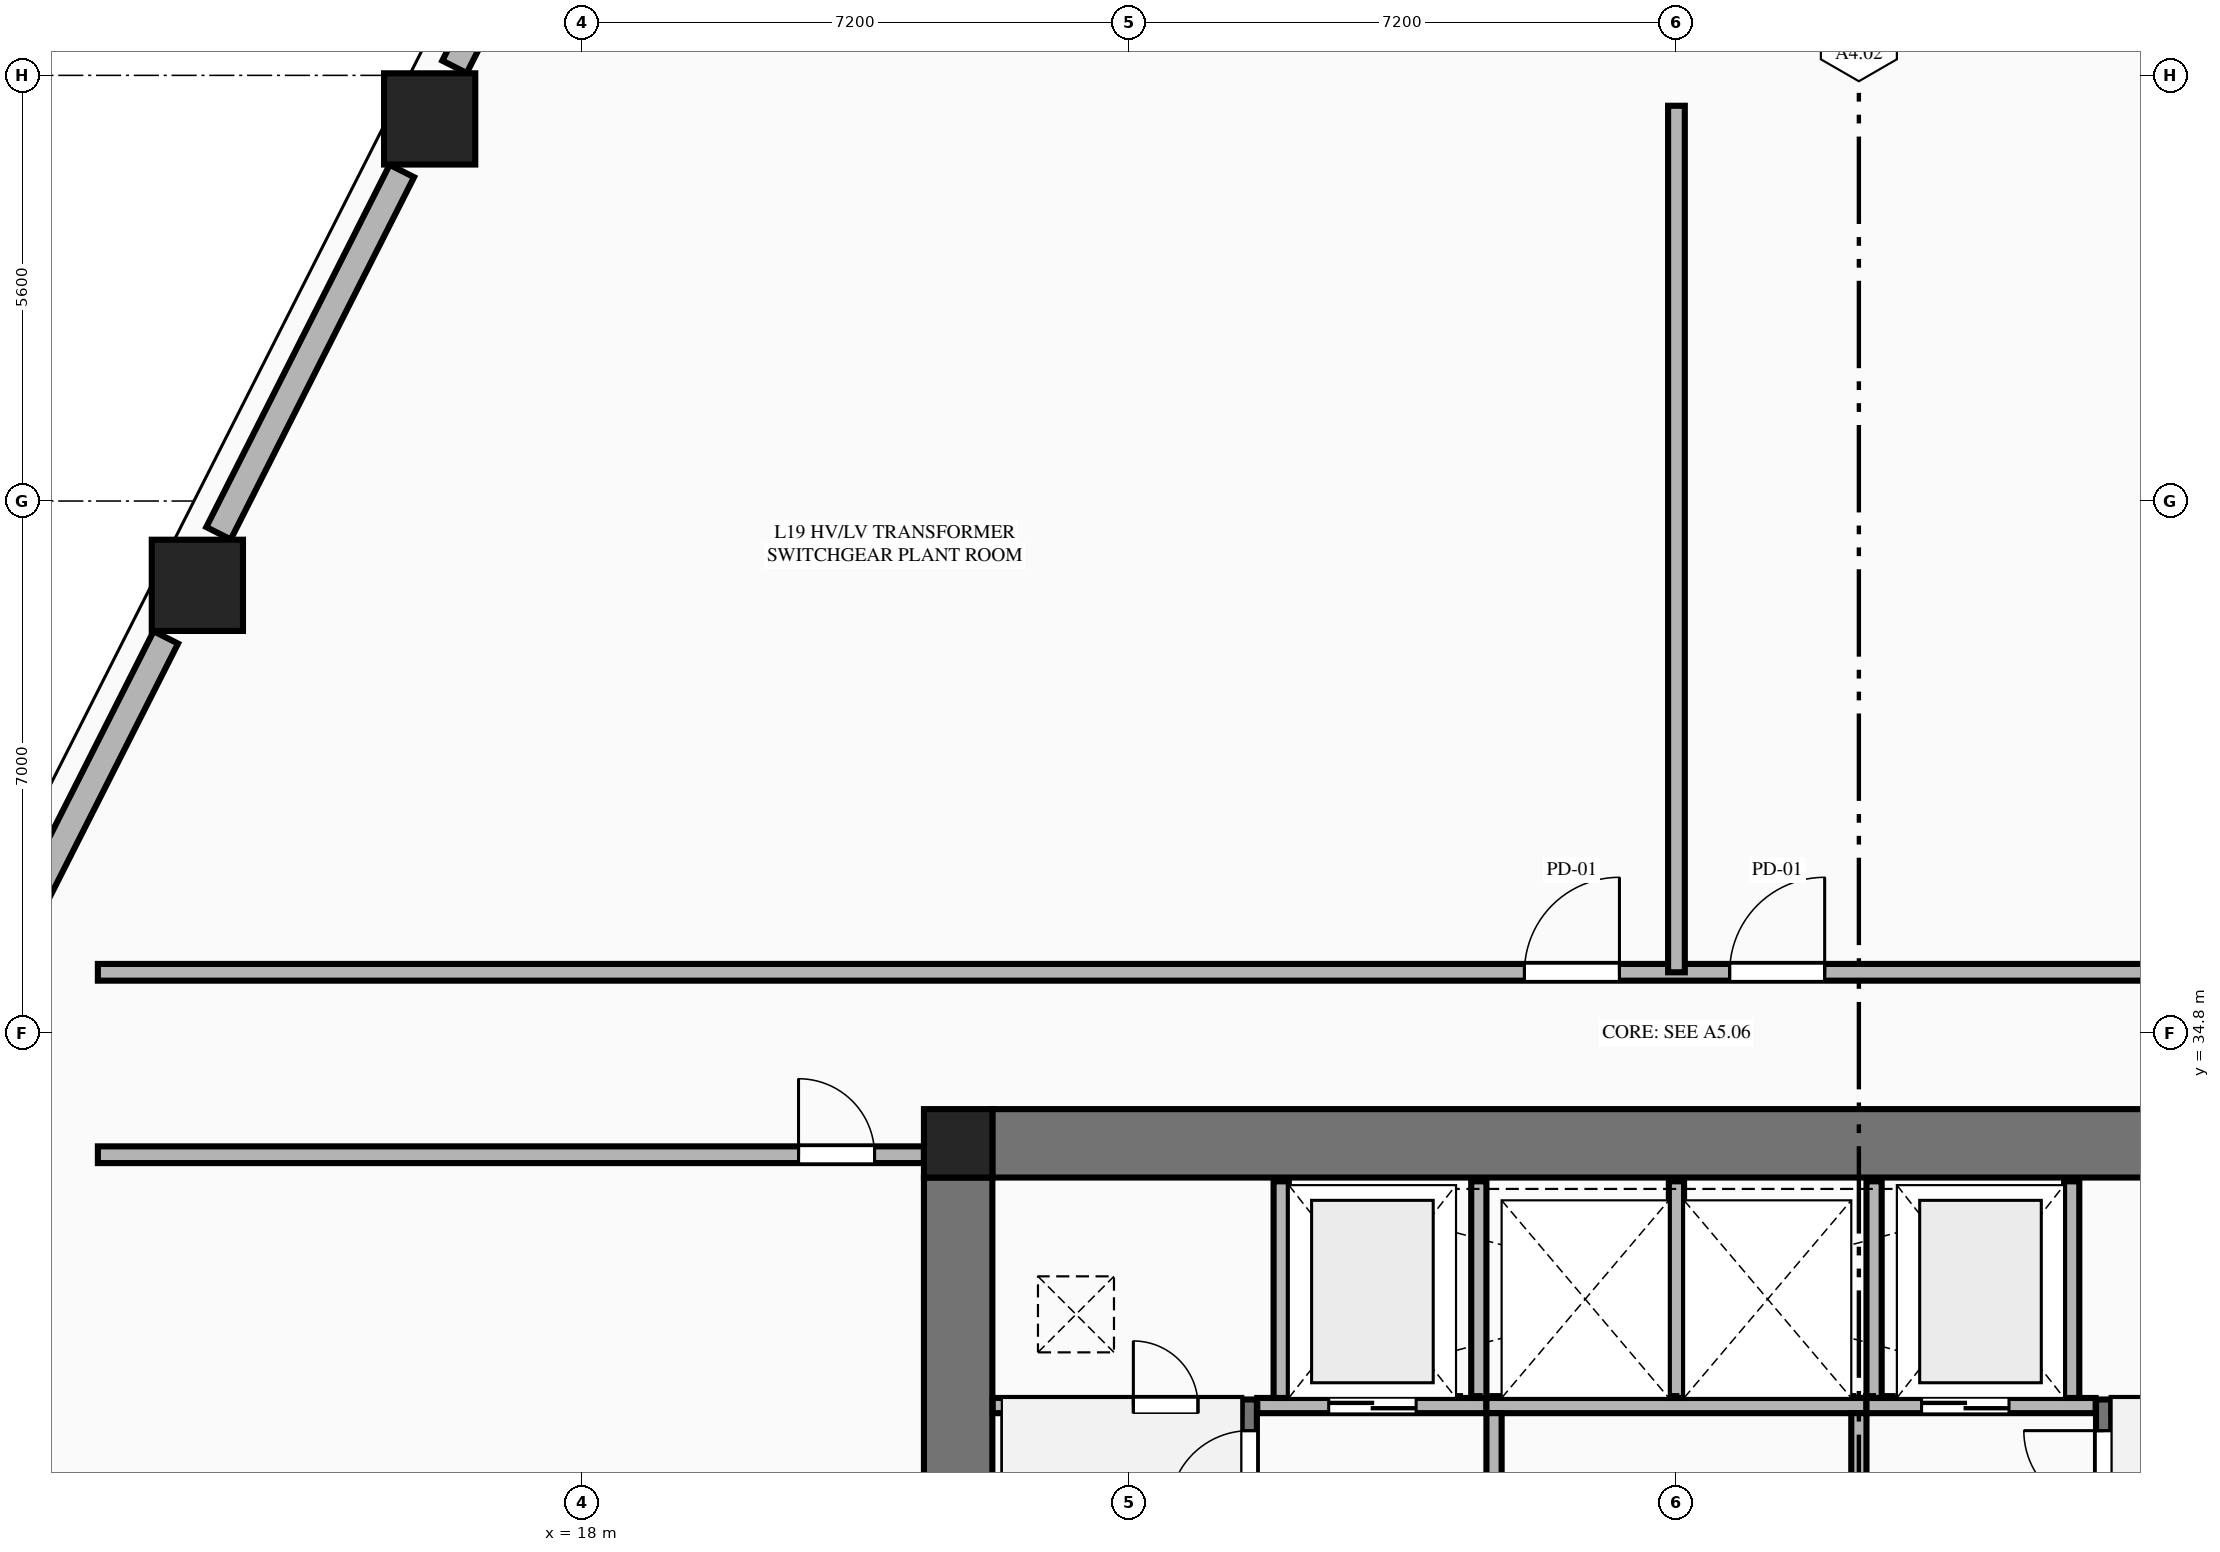
"""IFC4 building model, lengths in metres.
Left out: names, types, materials, properties, quantities, classifications, styles, units other than length and angle.
Written with IfcOpenShell. Run it as: python <this file> out.ifc"""

import sys

from ifc_helpers import new_model, si_unit, direction, frame, frame_2d, origin, origin_2d, place, context, subcontext, project, spatial, rectangle, extrude, element, fill, save


model = new_model("IFC4")
c1 = context("Model", 3, precision=1e-05, world=origin(), true_north=direction((0.0, 1.0)))
c2 = subcontext(c1, "Body", "Model", "MODEL_VIEW")
j1 = project(units=[si_unit("LENGTHUNIT", "METRE"), si_unit("PLANEANGLEUNIT", "RADIAN")], contexts=[c1])
p1 = place(None, origin())
s1 = spatial("IfcSite", under=j1, at=p1, CompositionType="ELEMENT")
p2 = place(p1, origin())
s2 = spatial("IfcBuilding", under=s1, at=p2, CompositionType="ELEMENT")
p3 = place(p2, frame((0.0, 0.0, 74.6)))
s3 = spatial("IfcBuildingStorey", under=s2, at=p3, CompositionType="ELEMENT", Elevation=74.6)
p4 = place(p3, frame((22.95, 33.35, 0.0), z_axis=(0.0, 0.0, 1.0), x_axis=(1.0, 0.0, 0.0)))
e1 = element("IfcColumn", 1, at=p4, inside=s3, PredefinedType="COLUMN", context=c2, shape_type="SweptSolid", body=[
    extrude(rectangle(XDim=0.9, YDim=0.9, at=origin_2d()), origin(), (0.0, 0.0, 1.0), 5.4),
])
p5 = place(p3, frame((23.4, 33.35, 0.0), z_axis=(0.0, 0.0, 1.0), x_axis=(1.0, 0.0, 0.0)))
e2 = element("IfcWall", 2, at=p5, inside=s3, PredefinedType="SHEAR", context=c2, shape_type="SweptSolid", body=[
    extrude(rectangle(XDim=18.0, YDim=0.9, at=frame_2d((9.0, 0.0))), origin(), (0.0, 0.0, 1.0), 5.18),
])
p6 = place(p3, frame((22.95, 18.9, 0.0), z_axis=(0.0, 0.0, 1.0), x_axis=(0.0, 1.0, 0.0)))
e3 = element("IfcWall", 3, at=p6, inside=s3, PredefinedType="SHEAR", context=c2, shape_type="SweptSolid", body=[
    extrude(rectangle(XDim=14.0, YDim=0.9, at=frame_2d((7.0, 0.0))), origin(), (0.0, 0.0, 1.0), 5.18),
])
p7 = place(p6, frame((2.94, 0.0, 0.0)))
e4 = element("IfcOpeningElement", 4, at=p7, cuts=e3, PredefinedType="OPENING", context=c2, shape_type="SweptSolid", body=[
    extrude(rectangle(XDim=1.22, YDim=2.25, at=frame_2d((0.61, 1.125))), frame((0.0, 0.46, 0.0), z_axis=(0.0, -1.0, 0.0), x_axis=(1.0, 0.0, 0.0)), (0.0, 0.0, 1.0), 0.92),
])
for number, where, z_axis, x_axis in (
    (5, (15.997, 46.827, 0.0), (0.0, 0.0, 1.0), (1.0, 0.0, 0.0)),
    (6, (12.941, 40.691, 0.0), (0.0, 0.0, 1.0), (1.0, 0.0, 0.0)),
):
    element("IfcColumn", number, at=place(p3, frame(where, z_axis=z_axis, x_axis=x_axis)), inside=s3, PredefinedType="COLUMN", context=c2, shape_type="SweptSolid", body=[
        extrude(rectangle(XDim=1.2, YDim=1.2, at=origin_2d()), origin(), (0.0, 0.0, 1.0), 5.4),
    ])
p8 = place(p3, frame((26.78, 23.2, 0.0), z_axis=(0.0, 0.0, 1.0), x_axis=(0.0, 1.0, 0.0)))
e7 = element("IfcWall", 7, at=p8, inside=s3, PredefinedType="SHEAR", context=c2, shape_type="SweptSolid", body=[
    extrude(rectangle(XDim=6.78, YDim=0.2, at=frame_2d((3.39, 0.0))), origin(), (0.0, 0.0, 1.0), 5.4),
])
p9 = place(p8, frame((5.32, 0.0, 0.0)))
e8 = element("IfcOpeningElement", 8, at=p9, cuts=e7, PredefinedType="OPENING", context=c2, shape_type="SweptSolid", body=[
    extrude(rectangle(XDim=1.05, YDim=2.15, at=frame_2d((0.525, 1.075))), frame((0.0, 0.11, 0.0), z_axis=(0.0, -1.0, 0.0), x_axis=(1.0, 0.0, 0.0)), (0.0, 0.0, 1.0), 0.22),
])
p10 = place(p3, frame((38.02, 23.2, 0.0), z_axis=(0.0, 0.0, 1.0), x_axis=(0.0, 1.0, 0.0)))
e9 = element("IfcWall", 9, at=p10, inside=s3, PredefinedType="SHEAR", context=c2, shape_type="SweptSolid", body=[
    extrude(rectangle(XDim=6.78, YDim=0.2, at=frame_2d((3.39, 0.0))), origin(), (0.0, 0.0, 1.0), 5.4),
])
p11 = place(p10, frame((5.32, 0.0, 0.0)))
e10 = element("IfcOpeningElement", 10, at=p11, cuts=e9, PredefinedType="OPENING", context=c2, shape_type="SweptSolid", body=[
    extrude(rectangle(XDim=1.05, YDim=2.15, at=frame_2d((0.525, 1.075))), frame((0.0, 0.11, 0.0), z_axis=(0.0, -1.0, 0.0), x_axis=(1.0, 0.0, 0.0)), (0.0, 0.0, 1.0), 0.22),
])
p12 = place(p3, frame((23.405, 29.9, 0.0), z_axis=(0.0, 0.0, 1.0), x_axis=(1.0, 0.0, 0.0)))
e11 = element("IfcWall", 11, at=p12, inside=s3, PredefinedType="PLUMBINGWALL", context=c2, shape_type="SweptSolid", body=[
    extrude(rectangle(XDim=3.27, YDim=0.2, at=frame_2d((1.635, 0.0))), origin(), (0.0, 0.0, 1.0), 5.18),
])
p13 = place(p12, frame((1.85, 0.0, 0.0)))
e12 = element("IfcOpeningElement", 12, at=p13, cuts=e11, PredefinedType="OPENING", context=c2, shape_type="SweptSolid", body=[
    extrude(rectangle(XDim=0.85, YDim=2.05, at=frame_2d((0.425, 1.025))), frame((0.0, 0.11, 0.0), z_axis=(0.0, -1.0, 0.0), x_axis=(1.0, 0.0, 0.0)), (0.0, 0.0, 1.0), 0.22),
])
p14 = place(p3, frame((26.885, 29.9, 0.0), z_axis=(0.0, 0.0, 1.0), x_axis=(1.0, 0.0, 0.0)))
e13 = element("IfcWall", 13, at=p14, inside=s3, PredefinedType="PLUMBINGWALL", context=c2, shape_type="SweptSolid", body=[
    extrude(rectangle(XDim=3.015, YDim=0.2, at=frame_2d((1.507, 0.0))), origin(), (0.0, 0.0, 1.0), 5.18),
])
p15 = place(p14, frame((0.94, 0.0, 0.0)))
e14 = element("IfcOpeningElement", 14, at=p15, cuts=e13, PredefinedType="OPENING", context=c2, shape_type="SweptSolid", body=[
    extrude(rectangle(XDim=1.15, YDim=2.2, at=frame_2d((0.575, 1.1))), frame((0.0, 0.11, 0.0), z_axis=(0.0, -1.0, 0.0), x_axis=(1.0, 0.0, 0.0)), (0.0, 0.0, 1.0), 0.22),
])
p16 = place(p3, frame((29.9, 29.9, 0.0), z_axis=(0.0, 0.0, 1.0), x_axis=(1.0, 0.0, 0.0)))
e15 = element("IfcWall", 15, at=p16, inside=s3, PredefinedType="PLUMBINGWALL", context=c2, shape_type="SweptSolid", body=[
    extrude(rectangle(XDim=5.0, YDim=0.2, at=frame_2d((2.5, 0.0))), origin(), (0.0, 0.0, 1.0), 5.18),
])
p17 = place(p3, frame((34.9, 29.9, 0.0), z_axis=(0.0, 0.0, 1.0), x_axis=(1.0, 0.0, 0.0)))
e16 = element("IfcWall", 16, at=p17, inside=s3, PredefinedType="PLUMBINGWALL", context=c2, shape_type="SweptSolid", body=[
    extrude(rectangle(XDim=3.015, YDim=0.2, at=frame_2d((1.508, 0.0))), origin(), (0.0, 0.0, 1.0), 5.18),
])
p18 = place(p17, frame((0.725, 0.0, 0.0)))
e17 = element("IfcOpeningElement", 17, at=p18, cuts=e16, PredefinedType="OPENING", context=c2, shape_type="SweptSolid", body=[
    extrude(rectangle(XDim=1.15, YDim=2.2, at=frame_2d((0.575, 1.1))), frame((0.0, 0.11, 0.0), z_axis=(0.0, -1.0, 0.0), x_axis=(1.0, 0.0, 0.0)), (0.0, 0.0, 1.0), 0.22),
])
p19 = place(p3, frame((38.125, 29.9, 0.0), z_axis=(0.0, 0.0, 1.0), x_axis=(1.0, 0.0, 0.0)))
e18 = element("IfcWall", 18, at=p19, inside=s3, PredefinedType="PLUMBINGWALL", context=c2, shape_type="SweptSolid", body=[
    extrude(rectangle(XDim=3.27, YDim=0.2, at=frame_2d((1.635, 0.0))), origin(), (0.0, 0.0, 1.0), 5.18),
])
p20 = place(p19, frame((0.5, 0.0, 0.0)))
e19 = element("IfcOpeningElement", 19, at=p20, cuts=e18, PredefinedType="OPENING", context=c2, shape_type="SweptSolid", body=[
    extrude(rectangle(XDim=0.85, YDim=2.05, at=frame_2d((0.425, 1.025))), frame((0.0, 0.11, 0.0), z_axis=(0.0, -1.0, 0.0), x_axis=(1.0, 0.0, 0.0)), (0.0, 0.0, 1.0), 0.22),
])
for number, where, z_axis, x_axis in (
    (20, (27.2, 30.0, 0.0), (0.0, 0.0, 1.0), (0.0, 1.0, 0.0)),
    (21, (29.8, 30.0, 0.0), (0.0, 0.0, 1.0), (0.0, 1.0, 0.0)),
    (22, (32.4, 30.0, 0.0), (0.0, 0.0, 1.0), (0.0, 1.0, 0.0)),
    (23, (35.0, 30.0, 0.0), (0.0, 0.0, 1.0), (0.0, 1.0, 0.0)),
    (24, (37.6, 30.0, 0.0), (0.0, 0.0, 1.0), (0.0, 1.0, 0.0)),
):
    element("IfcWall", number, at=place(p3, frame(where, z_axis=z_axis, x_axis=x_axis)), inside=s3, PredefinedType="PLUMBINGWALL", context=c2, shape_type="SweptSolid", body=[
        extrude(rectangle(XDim=2.85, YDim=0.2, at=frame_2d((1.425, 0.0))), origin(), (0.0, 0.0, 1.0), 5.18),
    ])
p21 = place(p3, frame((30.0, 27.05, 0.0), z_axis=(0.0, 0.0, 1.0), x_axis=(0.0, 1.0, 0.0)))
e25 = element("IfcWall", 25, at=p21, inside=s3, PredefinedType="PLUMBINGWALL", context=c2, shape_type="SweptSolid", body=[
    extrude(rectangle(XDim=2.75, YDim=0.2, at=frame_2d((1.375, 0.0))), origin(), (0.0, 0.0, 1.0), 5.18),
])
p22 = place(p21, frame((0.85, 0.0, 0.0)))
e26 = element("IfcOpeningElement", 26, at=p22, cuts=e25, PredefinedType="OPENING", context=c2, shape_type="SweptSolid", body=[
    extrude(rectangle(XDim=1.0, YDim=2.15, at=frame_2d((0.5, 1.075))), frame((0.0, 0.11, 0.0), z_axis=(0.0, -1.0, 0.0), x_axis=(1.0, 0.0, 0.0)), (0.0, 0.0, 1.0), 0.22),
])
p23 = place(p3, frame((34.8, 27.05, 0.0), z_axis=(0.0, 0.0, 1.0), x_axis=(0.0, 1.0, 0.0)))
e27 = element("IfcWall", 27, at=p23, inside=s3, PredefinedType="PLUMBINGWALL", context=c2, shape_type="SweptSolid", body=[
    extrude(rectangle(XDim=2.75, YDim=0.2, at=frame_2d((1.375, 0.0))), origin(), (0.0, 0.0, 1.0), 5.18),
])
p24 = place(p23, frame((0.85, 0.0, 0.0)))
e28 = element("IfcOpeningElement", 28, at=p24, cuts=e27, PredefinedType="OPENING", context=c2, shape_type="SweptSolid", body=[
    extrude(rectangle(XDim=1.0, YDim=2.15, at=frame_2d((0.5, 1.075))), frame((0.0, 0.11, 0.0), z_axis=(0.0, -1.0, 0.0), x_axis=(1.0, 0.0, 0.0)), (0.0, 0.0, 1.0), 0.22),
])
p25 = place(p3, frame((11.632, 33.2, 0.0), z_axis=(0.0, 0.0, 1.0), x_axis=(1.0, 0.0, 0.0)))
e29 = element("IfcWall", 29, at=p25, inside=s3, PredefinedType="PARTITIONING", context=c2, shape_type="SweptSolid", body=[
    extrude(rectangle(XDim=10.868, YDim=0.22, at=frame_2d((5.434, 0.0))), origin(), (0.0, 0.0, 1.0), 4.487),
])
p26 = place(p25, frame((9.218, 0.0, 0.0)))
e30 = element("IfcOpeningElement", 30, at=p26, cuts=e29, PredefinedType="OPENING", context=c2, shape_type="SweptSolid", body=[
    extrude(rectangle(XDim=1.0, YDim=2.15, at=frame_2d((0.5, 1.075))), frame((0.0, 0.12, 0.0), z_axis=(0.0, -1.0, 0.0), x_axis=(1.0, 0.0, 0.0)), (0.0, 0.0, 1.0), 0.24),
])
p27 = place(p3, frame((11.632, 35.6, 0.0), z_axis=(0.0, 0.0, 1.0), x_axis=(1.0, 0.0, 0.0)))
e31 = element("IfcWall", 31, at=p27, inside=s3, PredefinedType="PARTITIONING", context=c2, shape_type="SweptSolid", body=[
    extrude(rectangle(XDim=41.536, YDim=0.22, at=frame_2d((20.768, 0.0))), origin(), (0.0, 0.0, 1.0), 5.18),
])
p28 = place(p27, frame((18.768, 0.0, 0.0)))
e32 = element("IfcOpeningElement", 32, at=p28, cuts=e31, PredefinedType="OPENING", context=c2, shape_type="SweptSolid", body=[
    extrude(rectangle(XDim=1.25, YDim=2.25, at=frame_2d((0.625, 1.125))), frame((0.0, 0.12, 0.0), z_axis=(0.0, -1.0, 0.0), x_axis=(1.0, 0.0, 0.0)), (0.0, 0.0, 1.0), 0.24),
])
p29 = place(p27, frame((21.468, 0.0, 0.0)))
e33 = element("IfcOpeningElement", 33, at=p29, cuts=e31, PredefinedType="OPENING", context=c2, shape_type="SweptSolid", body=[
    extrude(rectangle(XDim=1.25, YDim=2.25, at=frame_2d((0.625, 1.125))), frame((0.0, 0.12, 0.0), z_axis=(0.0, -1.0, 0.0), x_axis=(1.0, 0.0, 0.0)), (0.0, 0.0, 1.0), 0.24),
])
p30 = place(p3, frame((32.4, 35.6, 0.0), z_axis=(0.0, 0.0, 1.0), x_axis=(0.0, 1.0, 0.0)))
e34 = element("IfcWall", 34, at=p30, inside=s3, PredefinedType="PARTITIONING", context=c2, shape_type="SweptSolid", body=[
    extrude(rectangle(XDim=11.4, YDim=0.22, at=frame_2d((5.7, 0.0))), origin(), (0.0, 0.0, 1.0), 5.18),
])
p31 = place(p3, frame((16.701, 48.257, 0.0), z_axis=(0.0, 0.0, 1.0), x_axis=(-0.451418764337, -0.892312220697, 0.0)))
e35 = element("IfcWall", 35, at=p31, inside=s3, PredefinedType="STANDARD", context=c2, shape_type="SweptSolid", body=[
    extrude(rectangle(XDim=0.835, YDim=0.36, at=frame_2d((0.417, 0.0))), origin(), (0.0, 0.0, 1.0), 5.18),
])
p32 = place(p3, frame((15.631, 46.142, 0.0), z_axis=(0.0, 0.0, 1.0), x_axis=(-0.451559361714, -0.892241078884, 0.0)))
e36 = element("IfcWall", 36, at=p32, inside=s3, PredefinedType="STANDARD", context=c2, shape_type="SweptSolid", body=[
    extrude(rectangle(XDim=5.342, YDim=0.36, at=frame_2d((2.671, 0.0))), origin(), (0.0, 0.0, 1.0), 4.637),
])
p33 = place(p3, frame((12.526, 40.006, 0.0), z_axis=(0.0, 0.0, 1.0), x_axis=(-0.451458606243, -0.892292063648, 0.0)))
e37 = element("IfcWall", 37, at=p33, inside=s3, PredefinedType="STANDARD", context=c2, shape_type="SweptSolid", body=[
    extrude(rectangle(XDim=5.538, YDim=0.36, at=frame_2d((2.769, 0.0))), origin(), (0.0, 0.0, 1.0), 4.637),
])
p34 = place(p9, origin())
e38 = element("IfcDoor", 38, at=p34, inside=s3, OperationType="SINGLE_SWING_LEFT", PredefinedType="DOOR", context=c2, shape_type="SweptSolid", body=[
    extrude(rectangle(XDim=1.05, YDim=2.15, at=frame_2d((0.525, 1.075))), frame((0.0, 0.025, 0.0), z_axis=(0.0, -1.0, 0.0), x_axis=(1.0, 0.0, 0.0)), (0.0, 0.0, 1.0), 0.05),
])
fill(e8, e38)
p35 = place(p11, origin())
e39 = element("IfcDoor", 39, at=p35, inside=s3, OperationType="SINGLE_SWING_RIGHT", PredefinedType="DOOR", context=c2, shape_type="SweptSolid", body=[
    extrude(rectangle(XDim=1.05, YDim=2.15, at=frame_2d((0.525, 1.075))), frame((0.0, 0.025, 0.0), z_axis=(0.0, -1.0, 0.0), x_axis=(1.0, 0.0, 0.0)), (0.0, 0.0, 1.0), 0.05),
])
fill(e10, e39)
p36 = place(p13, origin())
e40 = element("IfcDoor", 40, at=p36, inside=s3, OperationType="SINGLE_SWING_LEFT", PredefinedType="DOOR", context=c2, shape_type="SweptSolid", body=[
    extrude(rectangle(XDim=0.85, YDim=2.05, at=frame_2d((0.425, 1.025))), frame((0.0, 0.025, 0.0), z_axis=(0.0, -1.0, 0.0), x_axis=(1.0, 0.0, 0.0)), (0.0, 0.0, 1.0), 0.05),
])
fill(e12, e40)
p37 = place(p15, origin())
e41 = element("IfcDoor", 41, at=p37, inside=s3, OperationType="DOUBLE_DOOR_SLIDING", PredefinedType="DOOR", context=c2, shape_type="SweptSolid", body=[
    extrude(rectangle(XDim=1.15, YDim=2.2, at=frame_2d((0.575, 1.1))), frame((0.0, 0.025, 0.0), z_axis=(0.0, -1.0, 0.0), x_axis=(1.0, 0.0, 0.0)), (0.0, 0.0, 1.0), 0.05),
])
fill(e14, e41)
p38 = place(p18, origin())
e42 = element("IfcDoor", 42, at=p38, inside=s3, OperationType="DOUBLE_DOOR_SLIDING", PredefinedType="DOOR", context=c2, shape_type="SweptSolid", body=[
    extrude(rectangle(XDim=1.15, YDim=2.2, at=frame_2d((0.575, 1.1))), frame((0.0, 0.025, 0.0), z_axis=(0.0, -1.0, 0.0), x_axis=(1.0, 0.0, 0.0)), (0.0, 0.0, 1.0), 0.05),
])
fill(e17, e42)
p39 = place(p26, origin())
e43 = element("IfcDoor", 43, at=p39, inside=s3, OperationType="SINGLE_SWING_LEFT", PredefinedType="DOOR", context=c2, shape_type="SweptSolid", body=[
    extrude(rectangle(XDim=1.0, YDim=2.15, at=frame_2d((0.5, 1.075))), frame((0.0, 0.025, 0.0), z_axis=(0.0, -1.0, 0.0), x_axis=(1.0, 0.0, 0.0)), (0.0, 0.0, 1.0), 0.05),
])
fill(e30, e43)
p40 = place(p28, origin())
e44 = element("IfcDoor", 44, at=p40, inside=s3, OperationType="SINGLE_SWING_RIGHT", PredefinedType="DOOR", context=c2, shape_type="SweptSolid", body=[
    extrude(rectangle(XDim=1.25, YDim=2.25, at=frame_2d((0.625, 1.125))), frame((0.0, 0.025, 0.0), z_axis=(0.0, -1.0, 0.0), x_axis=(1.0, 0.0, 0.0)), (0.0, 0.0, 1.0), 0.05),
])
fill(e32, e44)
p41 = place(p29, origin())
e45 = element("IfcDoor", 45, at=p41, inside=s3, OperationType="SINGLE_SWING_RIGHT", PredefinedType="DOOR", context=c2, shape_type="SweptSolid", body=[
    extrude(rectangle(XDim=1.25, YDim=2.25, at=frame_2d((0.625, 1.125))), frame((0.0, 0.025, 0.0), z_axis=(0.0, -1.0, 0.0), x_axis=(1.0, 0.0, 0.0)), (0.0, 0.0, 1.0), 0.05),
])
fill(e33, e45)
save(model, sys.argv[1])
